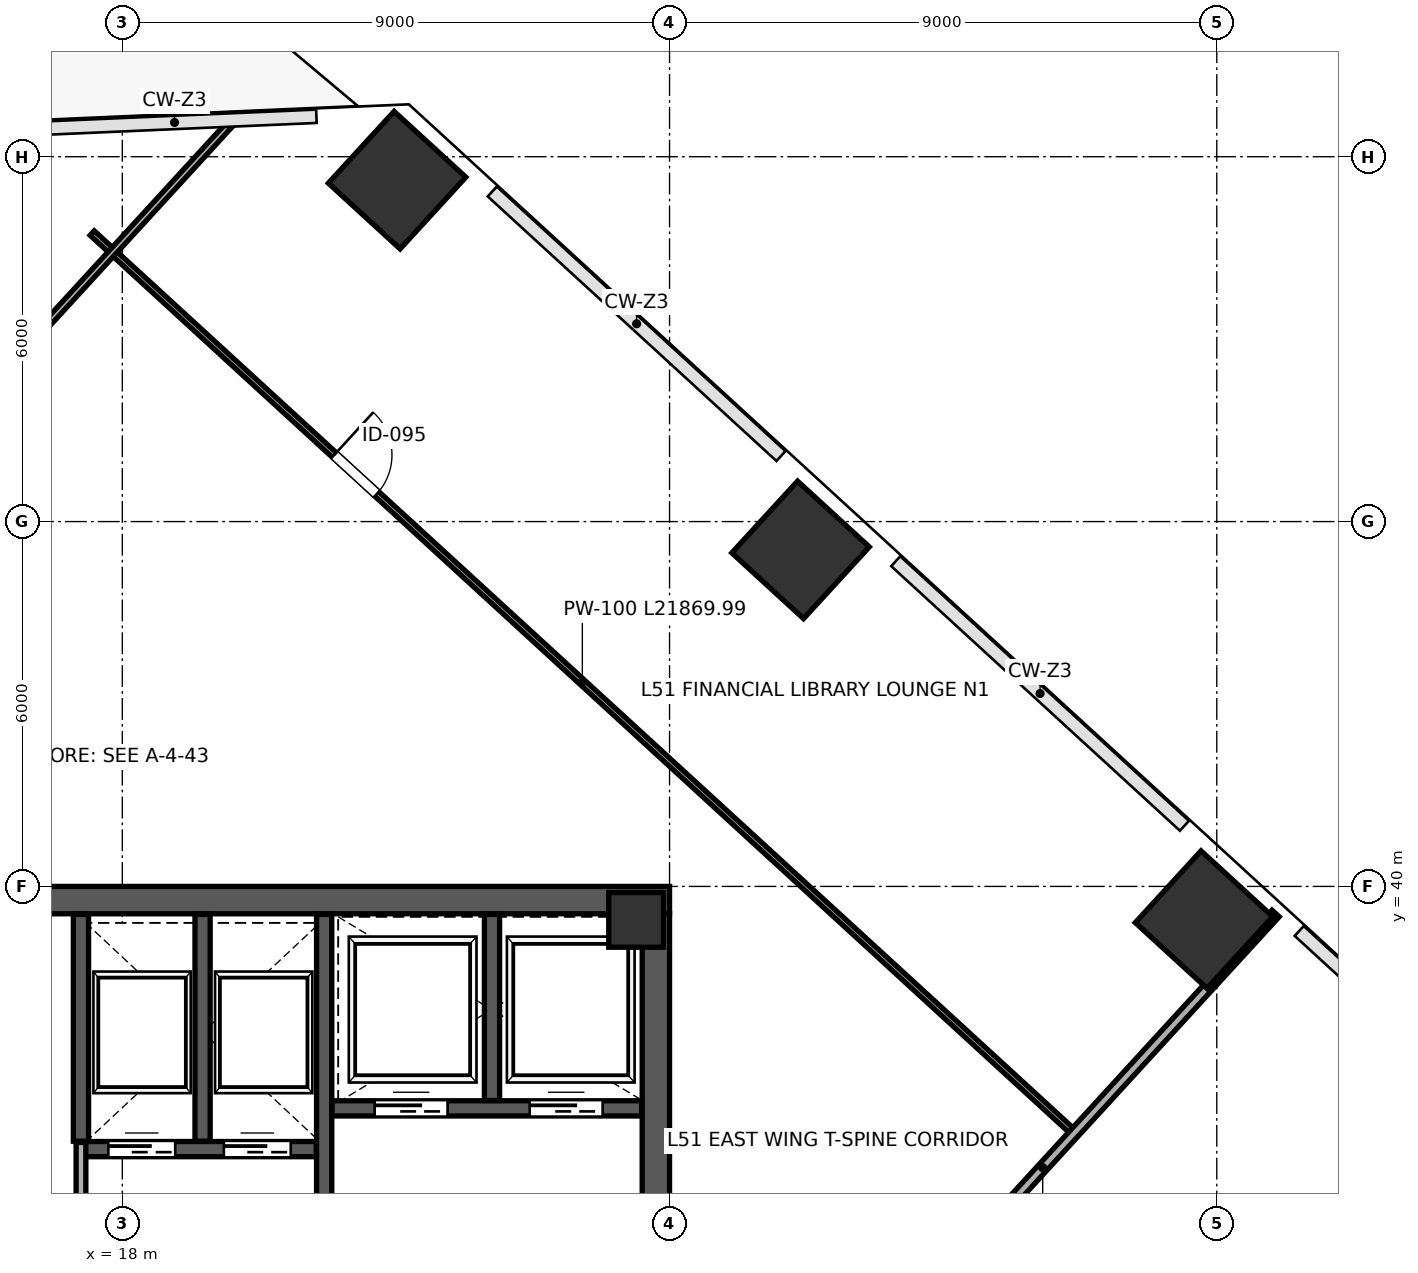
"""IFC4 building model, lengths in metres.
Left out: names, types, materials, properties, quantities, classifications, styles, units other than length and angle.
Written with IfcOpenShell. Run it as: python <this file> out.ifc"""

import sys

from ifc_helpers import new_model, si_unit, direction, frame, frame_2d, origin, origin_2d, place, context, subcontext, project, spatial, rectangle, extrude, source, transform, mapped, element, fill, save


model = new_model("IFC4")
c1 = context("Model", 3, precision=1e-05, world=origin(), true_north=direction((0.0, 1.0)))
c2 = subcontext(c1, "Body", "Model", "MODEL_VIEW")
j1 = project(units=[si_unit("LENGTHUNIT", "METRE"), si_unit("PLANEANGLEUNIT", "RADIAN")], contexts=[c1])
p1 = place(None, origin())
s1 = spatial("IfcSite", under=j1, at=p1, CompositionType="ELEMENT")
p2 = place(p1, origin())
s2 = spatial("IfcBuilding", under=s1, at=p2, CompositionType="ELEMENT")
p3 = place(p2, frame((0.0, 0.0, 229.0)))
s3 = spatial("IfcBuildingStorey", under=s2, at=p3, CompositionType="ELEMENT", Elevation=229.0)
m1 = source(origin(), c2, "Body", "SweptSolid", [
    extrude(rectangle(XDim=0.9, YDim=0.9, at=origin_2d()), origin(), (0.0, 0.0, 1.0), 4.198),
])
p4 = place(p3, frame((26.45, 39.45, 0.001), z_axis=(0.0, 0.0, 1.0), x_axis=(1.0, 0.0, 0.0)))
e1 = element("IfcColumn", 1, at=p4, inside=s3, PredefinedType="COLUMN", context=c2, shape_type="MappedRepresentation", body=[
    mapped(m1, transform((0.0, 0.0, 0.0), scale=1.0)),
])
m2 = source(origin(), c2, "Body", "SweptSolid", [
    extrude(rectangle(XDim=1.6, YDim=1.6, at=origin_2d()), origin(), (0.0, 0.0, 1.0), 4.198),
])
for number, where, z_axis, x_axis in (
    (2, (22.519, 51.615, 0.001), (0.0, 0.0, 1.0), (-0.737, 0.676, 0.0)),
    (3, (29.155, 45.534, 0.001), (0.0, 0.0, 1.0), (-0.737, 0.676, 0.0)),
    (4, (35.79, 39.454, 0.001), (0.0, 0.0, 1.0), (-0.737, 0.676, 0.0)),
):
    element("IfcColumn", number, at=place(p3, frame(where, z_axis=z_axis, x_axis=x_axis)), inside=s3, PredefinedType="COLUMN", context=c2, shape_type="MappedRepresentation", body=[
        mapped(m2, transform((0.0, 0.0, 0.0), scale=1.0)),
    ])
p5 = place(p3, frame((26.775, 24.45, 0.0), z_axis=(0.0, 0.0, 1.0), x_axis=(0.0, 1.0, 0.0)))
e5 = element("IfcWall", 5, at=p5, inside=s3, PredefinedType="SHEAR", context=c2, shape_type="SweptSolid", body=[
    extrude(rectangle(XDim=15.1, YDim=0.45, at=frame_2d((7.55, 0.0))), origin(), (0.0, 0.0, 1.0), 3.96),
])
p6 = place(p5, frame((8.6, 0.0, 0.0)))
e6 = element("IfcOpeningElement", 6, at=p6, cuts=e5, PredefinedType="OPENING", context=c2, shape_type="SweptSolid", body=[
    extrude(rectangle(XDim=1.15, YDim=2.2, at=frame_2d((0.575, 1.1))), frame((0.0, 0.235, 0.0), z_axis=(0.0, -1.0, 0.0), x_axis=(1.0, 0.0, 0.0)), (0.0, 0.0, 1.0), 0.47),
])
p7 = place(p3, frame((9.0, 39.775, 0.0), z_axis=(0.0, 0.0, 1.0), x_axis=(1.0, 0.0, 0.0)))
e7 = element("IfcWall", 7, at=p7, inside=s3, PredefinedType="SHEAR", context=c2, shape_type="SweptSolid", body=[
    extrude(rectangle(XDim=18.0, YDim=0.45, at=frame_2d((9.0, 0.0))), origin(), (0.0, 0.0, 1.0), 3.96),
])
p8 = place(p3, frame((21.32, 32.12, 0.0), z_axis=(0.0, 0.0, 1.0), x_axis=(0.0, 1.0, 0.0)))
e8 = element("IfcWall", 8, at=p8, inside=s3, PredefinedType="SHEAR", context=c2, shape_type="SweptSolid", body=[
    extrude(rectangle(XDim=7.42, YDim=0.25, at=frame_2d((3.71, 0.0))), origin(), (0.0, 0.0, 1.0), 3.96),
])
p9 = place(p8, frame((1.4, 0.0, 0.0)))
e9 = element("IfcOpeningElement", 9, at=p9, cuts=e8, PredefinedType="OPENING", context=c2, shape_type="SweptSolid", body=[
    extrude(rectangle(XDim=1.15, YDim=2.2, at=frame_2d((0.575, 1.1))), frame((0.0, 0.135, 0.0), z_axis=(0.0, -1.0, 0.0), x_axis=(1.0, 0.0, 0.0)), (0.0, 0.0, 1.0), 0.27),
])
p10 = place(p3, frame((21.45, 36.35, 0.0), z_axis=(0.0, 0.0, 1.0), x_axis=(1.0, 0.0, 0.0)))
e10 = element("IfcWall", 10, at=p10, inside=s3, PredefinedType="SHEAR", context=c2, shape_type="SweptSolid", body=[
    extrude(rectangle(XDim=5.09, YDim=0.25, at=frame_2d((2.545, 0.0))), origin(), (0.0, 0.0, 1.0), 3.96),
])
p11 = place(p10, frame((0.7, 0.0, 0.0)))
e11 = element("IfcOpeningElement", 11, at=p11, cuts=e10, PredefinedType="OPENING", context=c2, shape_type="SweptSolid", body=[
    extrude(rectangle(XDim=1.2, YDim=2.2, at=frame_2d((0.6, 1.1))), frame((0.0, 0.135, 0.0), z_axis=(0.0, -1.0, 0.0), x_axis=(1.0, 0.0, 0.0)), (0.0, 0.0, 1.0), 0.27),
])
p12 = place(p10, frame((3.25, 0.0, 0.0)))
e12 = element("IfcOpeningElement", 12, at=p12, cuts=e10, PredefinedType="OPENING", context=c2, shape_type="SweptSolid", body=[
    extrude(rectangle(XDim=1.2, YDim=2.2, at=frame_2d((0.6, 1.1))), frame((0.0, 0.135, 0.0), z_axis=(0.0, -1.0, 0.0), x_axis=(1.0, 0.0, 0.0)), (0.0, 0.0, 1.0), 0.27),
])
p13 = place(p3, frame((24.08, 36.48, 0.0), z_axis=(0.0, 0.0, 1.0), x_axis=(0.0, 1.0, 0.0)))
e13 = element("IfcWall", 13, at=p13, inside=s3, PredefinedType="SHEAR", context=c2, shape_type="SweptSolid", body=[
    extrude(rectangle(XDim=3.06, YDim=0.25, at=frame_2d((1.53, 0.0))), origin(), (0.0, 0.0, 1.0), 3.96),
])
p14 = place(p3, frame((17.32, 35.68, 0.0), z_axis=(0.0, 0.0, 1.0), x_axis=(1.0, 0.0, 0.0)))
e14 = element("IfcWall", 14, at=p14, inside=s3, PredefinedType="SHEAR", context=c2, shape_type="SweptSolid", body=[
    extrude(rectangle(XDim=3.87, YDim=0.25, at=frame_2d((1.935, 0.0))), origin(), (0.0, 0.0, 1.0), 3.96),
])
p15 = place(p14, frame((0.45, 0.0, 0.0)))
e15 = element("IfcOpeningElement", 15, at=p15, cuts=e14, PredefinedType="OPENING", context=c2, shape_type="SweptSolid", body=[
    extrude(rectangle(XDim=1.1, YDim=2.2, at=frame_2d((0.55, 1.1))), frame((0.0, 0.135, 0.0), z_axis=(0.0, -1.0, 0.0), x_axis=(1.0, 0.0, 0.0)), (0.0, 0.0, 1.0), 0.27),
])
p16 = place(p14, frame((2.35, 0.0, 0.0)))
e16 = element("IfcOpeningElement", 16, at=p16, cuts=e14, PredefinedType="OPENING", context=c2, shape_type="SweptSolid", body=[
    extrude(rectangle(XDim=1.1, YDim=2.2, at=frame_2d((0.55, 1.1))), frame((0.0, 0.135, 0.0), z_axis=(0.0, -1.0, 0.0), x_axis=(1.0, 0.0, 0.0)), (0.0, 0.0, 1.0), 0.27),
])
for number, where, z_axis, x_axis in (
    (17, (17.32, 35.81, 0.0), (0.0, 0.0, 1.0), (0.0, 1.0, 0.0)),
    (18, (19.32, 35.81, 0.0), (0.0, 0.0, 1.0), (0.0, 1.0, 0.0)),
):
    element("IfcWall", number, at=place(p3, frame(where, z_axis=z_axis, x_axis=x_axis)), inside=s3, PredefinedType="SHEAR", context=c2, shape_type="SweptSolid", body=[
        extrude(rectangle(XDim=3.73, YDim=0.25, at=frame_2d((1.865, 0.0))), origin(), (0.0, 0.0, 1.0), 3.96),
    ])
p17 = place(p3, frame((17.32, 33.86, 0.0), z_axis=(0.0, 0.0, 1.0), x_axis=(0.0, 1.0, 0.0)))
e19 = element("IfcWall", 19, at=p17, inside=s3, PredefinedType="PARTITIONING", context=c2, shape_type="SweptSolid", body=[
    extrude(rectangle(XDim=1.93, YDim=0.16, at=frame_2d((0.965, 0.0))), origin(), (0.0, 0.0, 1.0), 3.96),
])
p18 = place(p3, frame((17.504, 50.744, 0.0), z_axis=(0.0, 0.0, 1.0), x_axis=(0.737277850523, -0.675589646996, 0.0)))
e20 = element("IfcWall", 20, at=p18, inside=s3, PredefinedType="PARTITIONING", context=c2, shape_type="SweptSolid", body=[
    extrude(rectangle(XDim=21.87, YDim=0.1, at=frame_2d((10.935, 0.0))), origin(), (0.0, 0.0, 1.0), 3.96),
])
p19 = place(p18, frame((5.4, 0.0, 0.0)))
e21 = element("IfcOpeningElement", 21, at=p19, cuts=e20, PredefinedType="OPENING", context=c2, shape_type="SweptSolid", body=[
    extrude(rectangle(XDim=0.95, YDim=2.15, at=frame_2d((0.475, 1.075))), frame((0.0, 0.06, 0.0), z_axis=(0.0, -1.0, 0.0), x_axis=(1.0, 0.0, 0.0)), (0.0, 0.0, 1.0), 0.12),
])
p20 = place(p3, frame((1.73, 32.85, 0.0), z_axis=(0.0, 0.0, 1.0), x_axis=(0.675589845589, 0.737277668546, 0.0)))
e22 = element("IfcWall", 22, at=p20, inside=s3, PredefinedType="PARTITIONING", context=c2, shape_type="SweptSolid", body=[
    extrude(rectangle(XDim=26.742, YDim=0.115, at=frame_2d((13.371, 0.0))), origin(), (0.0, 0.0, 1.0), 3.96),
])
p21 = place(p3, frame((29.307, 31.194, 0.0), z_axis=(0.0, 0.0, 1.0), x_axis=(0.67558228032, 0.73728460076, 0.0)))
e23 = element("IfcWall", 23, at=p21, inside=s3, PredefinedType="PARTITIONING", context=c2, shape_type="SweptSolid", body=[
    extrude(rectangle(XDim=11.34, YDim=0.16, at=frame_2d((5.67, 0.0))), origin(), (0.0, 0.0, 1.0), 3.195),
])
m3 = source(origin(), c2, "Body", "SweptSolid", [
    extrude(rectangle(XDim=1.1, YDim=2.2, at=frame_2d((0.55, 1.1))), frame((0.0, 0.025, 0.0), z_axis=(0.0, -1.0, 0.0), x_axis=(1.0, 0.0, 0.0)), (0.0, 0.0, 1.0), 0.05),
])
p22 = place(p15, origin())
e24 = element("IfcDoor", 24, at=p22, inside=s3, OperationType="SLIDING_TO_LEFT", PredefinedType="DOOR", context=c2, shape_type="MappedRepresentation", body=[
    mapped(m3, transform((0.0, 0.0, 0.0), scale=1.0)),
])
fill(e15, e24)
p23 = place(p16, origin())
e25 = element("IfcDoor", 25, at=p23, inside=s3, OperationType="SLIDING_TO_RIGHT", PredefinedType="DOOR", context=c2, shape_type="MappedRepresentation", body=[
    mapped(m3, transform((0.0, 0.0, 0.0), scale=1.0)),
])
fill(e16, e25)
m4 = source(origin(), c2, "Body", "SweptSolid", [
    extrude(rectangle(XDim=1.2, YDim=2.2, at=frame_2d((0.6, 1.1))), frame((0.0, 0.025, 0.0), z_axis=(0.0, -1.0, 0.0), x_axis=(1.0, 0.0, 0.0)), (0.0, 0.0, 1.0), 0.05),
])
p24 = place(p11, origin())
e26 = element("IfcDoor", 26, at=p24, inside=s3, OperationType="SLIDING_TO_LEFT", PredefinedType="DOOR", context=c2, shape_type="MappedRepresentation", body=[
    mapped(m4, transform((0.0, 0.0, 0.0), scale=1.0)),
])
fill(e11, e26)
p25 = place(p12, origin())
e27 = element("IfcDoor", 27, at=p25, inside=s3, OperationType="SLIDING_TO_RIGHT", PredefinedType="DOOR", context=c2, shape_type="MappedRepresentation", body=[
    mapped(m4, transform((0.0, 0.0, 0.0), scale=1.0)),
])
fill(e12, e27)
m5 = source(origin(), c2, "Body", "SweptSolid", [
    extrude(rectangle(XDim=0.95, YDim=2.15, at=frame_2d((0.475, 1.075))), frame((0.0, 0.025, 0.0), z_axis=(0.0, -1.0, 0.0), x_axis=(1.0, 0.0, 0.0)), (0.0, 0.0, 1.0), 0.05),
])
p26 = place(p19, origin())
e28 = element("IfcDoor", 28, at=p26, inside=s3, OperationType="SINGLE_SWING_LEFT", PredefinedType="DOOR", context=c2, shape_type="MappedRepresentation", body=[
    mapped(m5, transform((0.0, 0.0, 0.0), scale=1.0)),
])
fill(e21, e28)
save(model, sys.argv[1])
